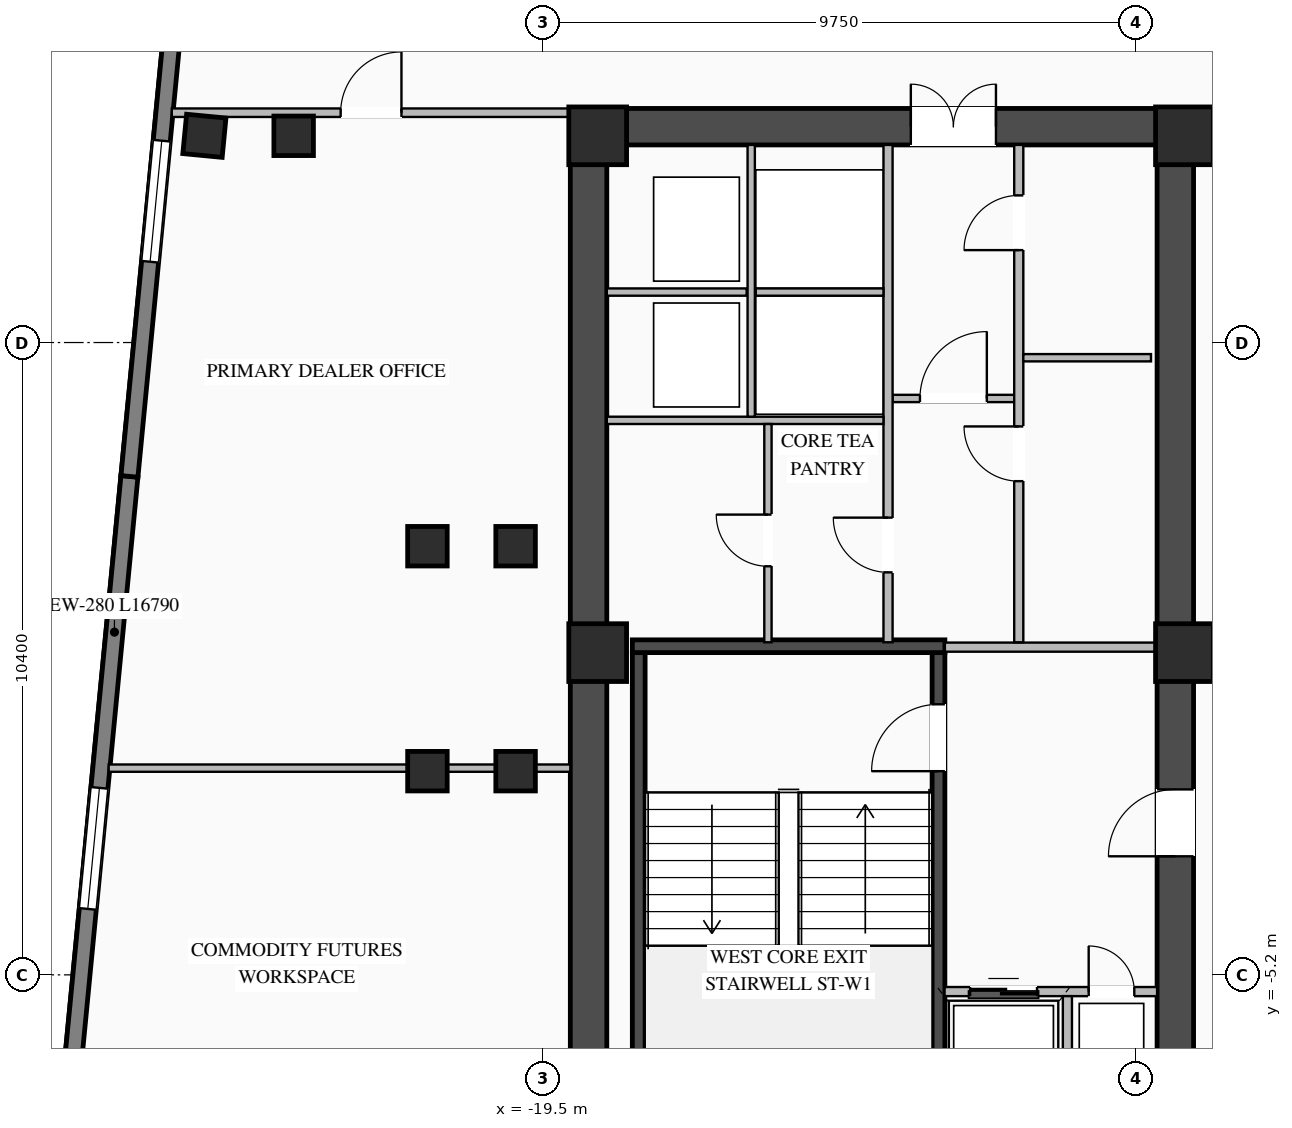
"""IFC4 building model, lengths in metres.
Left out: names, types, materials, properties, quantities, classifications, styles, units other than length and angle.
Written with IfcOpenShell. Run it as: python <this file> out.ifc"""

import sys

from ifc_helpers import new_model, si_unit, direction, frame, frame_2d, origin, origin_2d, place, context, subcontext, project, spatial, rectangle, i_section, extrude, element, fill, save


model = new_model("IFC4")
c1 = context("Model", 3, precision=1e-05, world=origin(), true_north=direction((0.0, 1.0)))
c2 = subcontext(c1, "Body", "Model", "MODEL_VIEW")
j1 = project(units=[si_unit("LENGTHUNIT", "METRE"), si_unit("PLANEANGLEUNIT", "RADIAN")], contexts=[c1])
p1 = place(None, origin())
s1 = spatial("IfcSite", under=j1, at=p1, CompositionType="ELEMENT")
p2 = place(p1, origin())
s2 = spatial("IfcBuilding", under=s1, at=p2, CompositionType="ELEMENT")
p3 = place(p2, frame((0.0, 0.0, 181.1)))
s3 = spatial("IfcBuildingStorey", under=s2, at=p3, CompositionType="ELEMENT", Elevation=181.1)
p4 = place(p3, frame((-19.05, 8.75, 0.0), z_axis=(0.0, 0.0, 1.0), x_axis=(1.0, 0.0, 0.0)))
e1 = element("IfcWall", 1, at=p4, inside=s3, PredefinedType="SHEAR", context=c2, shape_type="SweptSolid", body=[
    extrude(rectangle(XDim=10.25, YDim=0.6, at=frame_2d((5.125, 0.0))), origin(), (0.0, 0.0, 1.0), 3.27),
])
p5 = place(p4, frame((5.6, 0.0, 0.0)))
e2 = element("IfcOpeningElement", 2, at=p5, cuts=e1, PredefinedType="OPENING", context=c2, shape_type="SweptSolid", body=[
    extrude(rectangle(XDim=1.4, YDim=2.05, at=frame_2d((0.7, 1.025))), frame((0.0, 0.31, 0.0), z_axis=(0.0, -1.0, 0.0), x_axis=(1.0, 0.0, 0.0)), (0.0, 0.0, 1.0), 0.62),
])
p6 = place(p3, frame((-18.75, -8.45, 0.0), z_axis=(0.0, 0.0, 1.0), x_axis=(0.0, 1.0, 0.0)))
e3 = element("IfcWall", 3, at=p6, inside=s3, PredefinedType="SHEAR", context=c2, shape_type="SweptSolid", body=[
    extrude(rectangle(XDim=16.9, YDim=0.6, at=frame_2d((8.45, 0.0))), origin(), (0.0, 0.0, 1.0), 3.27),
])
p7 = place(p3, frame((-9.1, -8.45, 0.0), z_axis=(0.0, 0.0, 1.0), x_axis=(0.0, 1.0, 0.0)))
e4 = element("IfcWall", 4, at=p7, inside=s3, PredefinedType="SHEAR", context=c2, shape_type="SweptSolid", body=[
    extrude(rectangle(XDim=16.9, YDim=0.6, at=frame_2d((8.45, 0.0))), origin(), (0.0, 0.0, 1.0), 3.27),
])
p8 = place(p7, frame((5.2, 0.0, 0.0)))
e5 = element("IfcOpeningElement", 5, at=p8, cuts=e4, PredefinedType="OPENING", context=c2, shape_type="SweptSolid", body=[
    extrude(rectangle(XDim=1.1, YDim=2.08, at=frame_2d((0.55, 1.04))), frame((0.0, 0.31, 0.0), z_axis=(0.0, -1.0, 0.0), x_axis=(1.0, 0.0, 0.0)), (0.0, 0.0, 1.0), 0.62),
])
p9 = place(p3, frame((-12.995, -8.1, 0.0), z_axis=(0.0, 0.0, 1.0), x_axis=(0.0, 1.0, 0.0)))
e6 = element("IfcWall", 6, at=p9, inside=s3, PredefinedType="SHEAR", context=c2, shape_type="SweptSolid", body=[
    extrude(rectangle(XDim=8.2, YDim=0.21, at=frame_2d((4.1, 0.0))), origin(), (0.0, 0.0, 1.0), 3.27),
])
p10 = place(p9, frame((6.25, 0.0, 0.0)))
e7 = element("IfcOpeningElement", 7, at=p10, cuts=e6, PredefinedType="OPENING", context=c2, shape_type="SweptSolid", body=[
    extrude(rectangle(XDim=1.1, YDim=2.15, at=frame_2d((0.55, 1.075))), frame((0.0, 0.115, 0.0), z_axis=(0.0, -1.0, 0.0), x_axis=(1.0, 0.0, 0.0)), (0.0, 0.0, 1.0), 0.23),
])
p11 = place(p3, frame((-17.925, -8.1, 0.0), z_axis=(0.0, 0.0, 1.0), x_axis=(0.0, 1.0, 0.0)))
e8 = element("IfcWall", 8, at=p11, inside=s3, PredefinedType="SHEAR", context=c2, shape_type="SweptSolid", body=[
    extrude(rectangle(XDim=8.2, YDim=0.21, at=frame_2d((4.1, 0.0))), origin(), (0.0, 0.0, 1.0), 3.27),
])
p12 = place(p3, frame((-12.89, 0.205, 0.0), z_axis=(0.0, 0.0, 1.0), x_axis=(-1.0, 0.0, 0.0)))
e9 = element("IfcWall", 9, at=p12, inside=s3, PredefinedType="SHEAR", context=c2, shape_type="SweptSolid", body=[
    extrude(rectangle(XDim=5.14, YDim=0.21, at=frame_2d((2.57, 0.0))), origin(), (0.0, 0.0, 1.0), 3.27),
])
for number, where, z_axis, x_axis in (
    (10, (-8.95, 0.1, 0.0), (0.0, 0.0, 1.0), (1.0, 0.0, 0.0)),
    (11, (-8.95, 8.6, 0.0), (0.0, 0.0, 1.0), (1.0, 0.0, 0.0)),
    (12, (-18.6, 0.1, 0.0), (0.0, 0.0, 1.0), (1.0, 0.0, 0.0)),
    (13, (-18.6, 8.6, 0.0), (0.0, 0.0, 1.0), (1.0, 0.0, 0.0)),
):
    element("IfcColumn", number, at=place(p3, frame(where, z_axis=z_axis, x_axis=x_axis)), inside=s3, PredefinedType="COLUMN", context=c2, shape_type="SweptSolid", body=[
        extrude(rectangle(XDim=0.95, YDim=0.95, at=origin_2d()), origin(), (0.0, 0.0, 1.0), 3.45),
    ])
for number, where, z_axis, x_axis in (
    (14, (-21.4, -1.85, 0.0), (0.0, 0.0, 1.0), (1.0, 0.0, 0.0)),
    (15, (-21.4, 1.85, 0.0), (0.0, 0.0, 1.0), (1.0, 0.0, 0.0)),
    (16, (-19.95, -1.85, 0.0), (0.0, 0.0, 1.0), (1.0, 0.0, 0.0)),
    (17, (-19.95, 1.85, 0.0), (0.0, 0.0, 1.0), (1.0, 0.0, 0.0)),
    (18, (-23.6, 8.6, 0.0), (0.0, 0.0, 1.0), (1.0, 0.0, 0.0)),
    (19, (-25.068, 8.6, 0.0), (0.0, 0.0, 1.0), (0.995, -0.096, 0.0)),
):
    element("IfcColumn", number, at=place(p3, frame(where, z_axis=z_axis, x_axis=x_axis)), inside=s3, PredefinedType="COLUMN", context=c2, shape_type="SweptSolid", body=[
        extrude(i_section(OverallWidth=0.65, OverallDepth=0.65, WebThickness=0.028, FlangeThickness=0.04, at=origin_2d()), origin(), (0.0, 0.0, 1.0), 3.45),
    ])
p13 = place(p3, frame((-27.91, -13.714, 0.0), z_axis=(0.0, 0.0, 1.0), x_axis=(0.095839027265, 0.995396845913, 0.0)))
e20 = element("IfcWall", 20, at=p13, inside=s3, PredefinedType="STANDARD", context=c2, shape_type="SweptSolid", body=[
    extrude(rectangle(XDim=16.79, YDim=0.28, at=frame_2d((8.395, 0.0))), origin(), (0.0, 0.0, 1.0), 3.25),
])
p14 = place(p13, frame((5.147, 0.0, 0.76)))
e21 = element("IfcOpeningElement", 21, at=p14, cuts=e20, PredefinedType="OPENING", context=c2, shape_type="SweptSolid", body=[
    extrude(rectangle(XDim=2.0, YDim=2.05, at=frame_2d((1.0, 1.025))), frame((0.0, 0.15, 0.0), z_axis=(0.0, -1.0, 0.0), x_axis=(1.0, 0.0, 0.0)), (0.0, 0.0, 1.0), 0.3),
])
p15 = place(p13, frame((9.643, 0.0, 0.76)))
e22 = element("IfcOpeningElement", 22, at=p15, cuts=e20, PredefinedType="OPENING", context=c2, shape_type="SweptSolid", body=[
    extrude(rectangle(XDim=2.0, YDim=2.05, at=frame_2d((1.0, 1.025))), frame((0.0, 0.15, 0.0), z_axis=(0.0, -1.0, 0.0), x_axis=(1.0, 0.0, 0.0)), (0.0, 0.0, 1.0), 0.3),
])
p16 = place(p3, frame((-26.301, 2.998, 0.0), z_axis=(0.0, 0.0, 1.0), x_axis=(0.095837640115, 0.99539697947, 0.0)))
e23 = element("IfcWall", 23, at=p16, inside=s3, PredefinedType="STANDARD", context=c2, shape_type="SweptSolid", body=[
    extrude(rectangle(XDim=16.79, YDim=0.28, at=frame_2d((8.395, 0.0))), origin(), (0.0, 0.0, 1.0), 3.25),
])
p17 = place(p16, frame((3.547, 0.0, 0.76)))
e24 = element("IfcOpeningElement", 24, at=p17, cuts=e23, PredefinedType="OPENING", context=c2, shape_type="SweptSolid", body=[
    extrude(rectangle(XDim=2.0, YDim=2.05, at=frame_2d((1.0, 1.025))), frame((0.0, 0.15, 0.0), z_axis=(0.0, -1.0, 0.0), x_axis=(1.0, 0.0, 0.0)), (0.0, 0.0, 1.0), 0.3),
])
p18 = place(p16, frame((10.193, 0.0, 0.76)))
e25 = element("IfcOpeningElement", 25, at=p18, cuts=e23, PredefinedType="OPENING", context=c2, shape_type="SweptSolid", body=[
    extrude(rectangle(XDim=2.0, YDim=2.05, at=frame_2d((1.0, 1.025))), frame((0.0, 0.15, 0.0), z_axis=(0.0, -1.0, 0.0), x_axis=(1.0, 0.0, 0.0)), (0.0, 0.0, 1.0), 0.3),
])
p19 = place(p3, frame((-12.895, -5.475, 0.0), z_axis=(0.0, 0.0, 1.0), x_axis=(1.0, 0.0, 0.0)))
e26 = element("IfcWall", 26, at=p19, inside=s3, PredefinedType="STANDARD", context=c2, shape_type="SweptSolid", body=[
    extrude(rectangle(XDim=3.495, YDim=0.15, at=frame_2d((1.748, 0.0))), origin(), (0.0, 0.0, 1.0), 3.25),
])
p20 = place(p19, frame((0.42, 0.0, 0.0)))
e27 = element("IfcOpeningElement", 27, at=p20, cuts=e26, PredefinedType="OPENING", context=c2, shape_type="SweptSolid", body=[
    extrude(rectangle(XDim=1.1, YDim=2.15, at=frame_2d((0.55, 1.075))), frame((0.0, 0.085, 0.0), z_axis=(0.0, -1.0, 0.0), x_axis=(1.0, 0.0, 0.0)), (0.0, 0.0, 1.0), 0.17),
])
p21 = place(p19, frame((2.37, 0.0, 0.0)))
e28 = element("IfcOpeningElement", 28, at=p21, cuts=e26, PredefinedType="OPENING", context=c2, shape_type="SweptSolid", body=[
    extrude(rectangle(XDim=0.75, YDim=2.05, at=frame_2d((0.375, 1.025))), frame((0.0, 0.085, 0.0), z_axis=(0.0, -1.0, 0.0), x_axis=(1.0, 0.0, 0.0)), (0.0, 0.0, 1.0), 0.17),
])
p22 = place(p3, frame((-10.875, -8.45, 0.0), z_axis=(0.0, 0.0, 1.0), x_axis=(0.0, 1.0, 0.0)))
e29 = element("IfcWall", 29, at=p22, inside=s3, PredefinedType="STANDARD", context=c2, shape_type="SweptSolid", body=[
    extrude(rectangle(XDim=2.9, YDim=0.15, at=frame_2d((1.45, 0.0))), origin(), (0.0, 0.0, 1.0), 3.25),
])
p23 = place(p3, frame((-12.89, 0.19, 0.0), z_axis=(0.0, 0.0, 1.0), x_axis=(1.0, 0.0, 0.0)))
e30 = element("IfcWall", 30, at=p23, inside=s3, PredefinedType="STANDARD", context=c2, shape_type="SweptSolid", body=[
    extrude(rectangle(XDim=3.49, YDim=0.15, at=frame_2d((1.745, 0.0))), origin(), (0.0, 0.0, 1.0), 2.645),
])
p24 = place(p3, frame((-13.75, 4.28, 0.0), z_axis=(0.0, 0.0, 1.0), x_axis=(1.0, 0.0, 0.0)))
e31 = element("IfcWall", 31, at=p24, inside=s3, PredefinedType="STANDARD", context=c2, shape_type="SweptSolid", body=[
    extrude(rectangle(XDim=2.0, YDim=0.12, at=frame_2d((1.0, 0.0))), origin(), (0.0, 0.0, 1.0), 3.25),
])
p25 = place(p24, frame((0.45, 0.0, 0.0)))
e32 = element("IfcOpeningElement", 32, at=p25, cuts=e31, PredefinedType="OPENING", context=c2, shape_type="SweptSolid", body=[
    extrude(rectangle(XDim=1.1, YDim=2.1, at=frame_2d((0.55, 1.05))), frame((0.0, 0.07, 0.0), z_axis=(0.0, -1.0, 0.0), x_axis=(1.0, 0.0, 0.0)), (0.0, 0.0, 1.0), 0.14),
])
p26 = place(p3, frame((-11.675, 0.27, 0.0), z_axis=(0.0, 0.0, 1.0), x_axis=(0.0, 1.0, 0.0)))
e33 = element("IfcWall", 33, at=p26, inside=s3, PredefinedType="STANDARD", context=c2, shape_type="SweptSolid", body=[
    extrude(rectangle(XDim=8.18, YDim=0.15, at=frame_2d((4.09, 0.0))), origin(), (0.0, 0.0, 1.0), 3.25),
])
p27 = place(p26, frame((2.65, 0.0, 0.0)))
e34 = element("IfcOpeningElement", 34, at=p27, cuts=e33, PredefinedType="OPENING", context=c2, shape_type="SweptSolid", body=[
    extrude(rectangle(XDim=0.9, YDim=2.05, at=frame_2d((0.45, 1.025))), frame((0.0, 0.085, 0.0), z_axis=(0.0, -1.0, 0.0), x_axis=(1.0, 0.0, 0.0)), (0.0, 0.0, 1.0), 0.17),
])
p28 = place(p26, frame((6.45, 0.0, 0.0)))
e35 = element("IfcOpeningElement", 35, at=p28, cuts=e33, PredefinedType="OPENING", context=c2, shape_type="SweptSolid", body=[
    extrude(rectangle(XDim=0.9, YDim=2.05, at=frame_2d((0.45, 1.025))), frame((0.0, 0.085, 0.0), z_axis=(0.0, -1.0, 0.0), x_axis=(1.0, 0.0, 0.0)), (0.0, 0.0, 1.0), 0.17),
])
p29 = place(p3, frame((-11.6, 4.95, 0.0), z_axis=(0.0, 0.0, 1.0), x_axis=(1.0, 0.0, 0.0)))
e36 = element("IfcWall", 36, at=p29, inside=s3, PredefinedType="STANDARD", context=c2, shape_type="SweptSolid", body=[
    extrude(rectangle(XDim=2.1, YDim=0.12, at=frame_2d((1.05, 0.0))), origin(), (0.0, 0.0, 1.0), 3.25),
])
p30 = place(p3, frame((-13.825, 0.27, 0.0), z_axis=(0.0, 0.0, 1.0), x_axis=(0.0, 1.0, 0.0)))
e37 = element("IfcWall", 37, at=p30, inside=s3, PredefinedType="STANDARD", context=c2, shape_type="SweptSolid", body=[
    extrude(rectangle(XDim=8.18, YDim=0.15, at=frame_2d((4.09, 0.0))), origin(), (0.0, 0.0, 1.0), 3.25),
])
p31 = place(p30, frame((1.15, 0.0, 0.0)))
e38 = element("IfcOpeningElement", 38, at=p31, cuts=e37, PredefinedType="OPENING", context=c2, shape_type="SweptSolid", body=[
    extrude(rectangle(XDim=0.9, YDim=2.05, at=frame_2d((0.45, 1.025))), frame((0.0, 0.085, 0.0), z_axis=(0.0, -1.0, 0.0), x_axis=(1.0, 0.0, 0.0)), (0.0, 0.0, 1.0), 0.17),
])
p32 = place(p3, frame((-18.45, 3.92, 0.0), z_axis=(0.0, 0.0, 1.0), x_axis=(1.0, 0.0, 0.0)))
e39 = element("IfcWall", 39, at=p32, inside=s3, PredefinedType="STANDARD", context=c2, shape_type="SweptSolid", body=[
    extrude(rectangle(XDim=4.55, YDim=0.12, at=frame_2d((2.275, 0.0))), origin(), (0.0, 0.0, 1.0), 3.25),
])
p33 = place(p3, frame((-18.45, 6.03, 0.0), z_axis=(0.0, 0.0, 1.0), x_axis=(1.0, 0.0, 0.0)))
e40 = element("IfcWall", 40, at=p33, inside=s3, PredefinedType="STANDARD", context=c2, shape_type="SweptSolid", body=[
    extrude(rectangle(XDim=2.3, YDim=0.12, at=frame_2d((1.15, 0.0))), origin(), (0.0, 0.0, 1.0), 3.25),
])
p34 = place(p3, frame((-16.075, 3.98, 0.0), z_axis=(0.0, 0.0, 1.0), x_axis=(0.0, 1.0, 0.0)))
e41 = element("IfcWall", 41, at=p34, inside=s3, PredefinedType="STANDARD", context=c2, shape_type="SweptSolid", body=[
    extrude(rectangle(XDim=4.47, YDim=0.12, at=frame_2d((2.235, 0.0))), origin(), (0.0, 0.0, 1.0), 3.25),
])
p35 = place(p3, frame((-16.0, 6.03, 0.0), z_axis=(0.0, 0.0, 1.0), x_axis=(1.0, 0.0, 0.0)))
e42 = element("IfcWall", 42, at=p35, inside=s3, PredefinedType="STANDARD", context=c2, shape_type="SweptSolid", body=[
    extrude(rectangle(XDim=2.1, YDim=0.12, at=frame_2d((1.05, 0.0))), origin(), (0.0, 0.0, 1.0), 3.25),
])
p36 = place(p3, frame((-15.8, 0.27, 0.0), z_axis=(0.0, 0.0, 1.0), x_axis=(0.0, 1.0, 0.0)))
e43 = element("IfcWall", 43, at=p36, inside=s3, PredefinedType="STANDARD", context=c2, shape_type="SweptSolid", body=[
    extrude(rectangle(XDim=3.59, YDim=0.12, at=frame_2d((1.795, 0.0))), origin(), (0.0, 0.0, 1.0), 3.25),
])
p37 = place(p36, frame((1.25, 0.0, 0.0)))
e44 = element("IfcOpeningElement", 44, at=p37, cuts=e43, PredefinedType="OPENING", context=c2, shape_type="SweptSolid", body=[
    extrude(rectangle(XDim=0.85, YDim=2.05, at=frame_2d((0.425, 1.025))), frame((0.0, 0.07, 0.0), z_axis=(0.0, -1.0, 0.0), x_axis=(1.0, 0.0, 0.0)), (0.0, 0.0, 1.0), 0.14),
])
p38 = place(p3, frame((-25.604, 8.98, 0.0), z_axis=(0.0, 0.0, 1.0), x_axis=(1.0, 0.0, 0.0)))
e45 = element("IfcWall", 45, at=p38, inside=s3, PredefinedType="STANDARD", context=c2, shape_type="SweptSolid", body=[
    extrude(rectangle(XDim=6.554, YDim=0.14, at=frame_2d((3.277, 0.0))), origin(), (0.0, 0.0, 1.0), 3.25),
])
p39 = place(p38, frame((2.777, 0.0, 0.0)))
e46 = element("IfcOpeningElement", 46, at=p39, cuts=e45, PredefinedType="OPENING", context=c2, shape_type="SweptSolid", body=[
    extrude(rectangle(XDim=1.0, YDim=2.08, at=frame_2d((0.5, 1.04))), frame((0.0, 0.08, 0.0), z_axis=(0.0, -1.0, 0.0), x_axis=(1.0, 0.0, 0.0)), (0.0, 0.0, 1.0), 0.16),
])
p40 = place(p3, frame((-26.642, -1.8, 0.0), z_axis=(0.0, 0.0, 1.0), x_axis=(1.0, 0.0, 0.0)))
e47 = element("IfcWall", 47, at=p40, inside=s3, PredefinedType="STANDARD", context=c2, shape_type="SweptSolid", body=[
    extrude(rectangle(XDim=7.592, YDim=0.12, at=frame_2d((3.796, 0.0))), origin(), (0.0, 0.0, 1.0), 3.25),
])
p41 = place(p15, origin())
e48 = element("IfcWindow", 48, at=p41, inside=s3, PartitioningType="DOUBLE_PANEL_VERTICAL", PredefinedType="WINDOW", context=c2, shape_type="SweptSolid", body=[
    extrude(rectangle(XDim=2.0, YDim=2.05, at=frame_2d((1.0, 1.025))), frame((0.0, 0.03, 0.0), z_axis=(0.0, -1.0, 0.0), x_axis=(1.0, 0.0, 0.0)), (0.0, 0.0, 1.0), 0.06),
])
fill(e22, e48)
p42 = place(p17, origin())
e49 = element("IfcWindow", 49, at=p42, inside=s3, PartitioningType="DOUBLE_PANEL_VERTICAL", PredefinedType="WINDOW", context=c2, shape_type="SweptSolid", body=[
    extrude(rectangle(XDim=2.0, YDim=2.05, at=frame_2d((1.0, 1.025))), frame((0.0, 0.03, 0.0), z_axis=(0.0, -1.0, 0.0), x_axis=(1.0, 0.0, 0.0)), (0.0, 0.0, 1.0), 0.06),
])
fill(e24, e49)
p43 = place(p10, origin())
e50 = element("IfcDoor", 50, at=p43, inside=s3, OperationType="SINGLE_SWING_LEFT", PredefinedType="DOOR", context=c2, shape_type="SweptSolid", body=[
    extrude(rectangle(XDim=1.1, YDim=2.15, at=frame_2d((0.55, 1.075))), frame((0.0, 0.025, 0.0), z_axis=(0.0, -1.0, 0.0), x_axis=(1.0, 0.0, 0.0)), (0.0, 0.0, 1.0), 0.05),
])
fill(e7, e50)
p44 = place(p20, origin())
e51 = element("IfcDoor", 51, at=p44, inside=s3, OperationType="DOUBLE_DOOR_SLIDING", PredefinedType="DOOR", context=c2, shape_type="SweptSolid", body=[
    extrude(rectangle(XDim=1.1, YDim=2.15, at=frame_2d((0.55, 1.075))), frame((0.0, 0.025, 0.0), z_axis=(0.0, -1.0, 0.0), x_axis=(1.0, 0.0, 0.0)), (0.0, 0.0, 1.0), 0.05),
])
fill(e27, e51)
p45 = place(p21, origin())
e52 = element("IfcDoor", 52, at=p45, inside=s3, OperationType="SINGLE_SWING_LEFT", PredefinedType="DOOR", context=c2, shape_type="SweptSolid", body=[
    extrude(rectangle(XDim=0.75, YDim=2.05, at=frame_2d((0.375, 1.025))), frame((0.0, 0.025, 0.0), z_axis=(0.0, -1.0, 0.0), x_axis=(1.0, 0.0, 0.0)), (0.0, 0.0, 1.0), 0.05),
])
fill(e28, e52)
p46 = place(p8, origin())
e53 = element("IfcDoor", 53, at=p46, inside=s3, OperationType="SINGLE_SWING_LEFT", PredefinedType="DOOR", context=c2, shape_type="SweptSolid", body=[
    extrude(rectangle(XDim=1.1, YDim=2.08, at=frame_2d((0.55, 1.04))), frame((0.0, 0.255, 0.0), z_axis=(0.0, -1.0, 0.0), x_axis=(1.0, 0.0, 0.0)), (0.0, 0.0, 1.0), 0.05),
])
fill(e5, e53)
p47 = place(p25, origin())
e54 = element("IfcDoor", 54, at=p47, inside=s3, OperationType="SINGLE_SWING_RIGHT", PredefinedType="DOOR", context=c2, shape_type="SweptSolid", body=[
    extrude(rectangle(XDim=1.1, YDim=2.1, at=frame_2d((0.55, 1.05))), frame((0.0, 0.025, 0.0), z_axis=(0.0, -1.0, 0.0), x_axis=(1.0, 0.0, 0.0)), (0.0, 0.0, 1.0), 0.05),
])
fill(e32, e54)
p48 = place(p5, origin())
e55 = element("IfcDoor", 55, at=p48, inside=s3, OperationType="DOUBLE_DOOR_SINGLE_SWING", PredefinedType="DOOR", context=c2, shape_type="SweptSolid", body=[
    extrude(rectangle(XDim=1.4, YDim=2.05, at=frame_2d((0.7, 1.025))), frame((0.0, 0.245, 0.0), z_axis=(0.0, -1.0, 0.0), x_axis=(1.0, 0.0, 0.0)), (0.0, 0.0, 1.0), 0.05),
])
fill(e2, e55)
p49 = place(p27, origin())
e56 = element("IfcDoor", 56, at=p49, inside=s3, OperationType="SINGLE_SWING_RIGHT", PredefinedType="DOOR", context=c2, shape_type="SweptSolid", body=[
    extrude(rectangle(XDim=0.9, YDim=2.05, at=frame_2d((0.45, 1.025))), frame((0.0, 0.025, 0.0), z_axis=(0.0, -1.0, 0.0), x_axis=(1.0, 0.0, 0.0)), (0.0, 0.0, 1.0), 0.05),
])
fill(e34, e56)
p50 = place(p28, origin())
e57 = element("IfcDoor", 57, at=p50, inside=s3, OperationType="SINGLE_SWING_LEFT", PredefinedType="DOOR", context=c2, shape_type="SweptSolid", body=[
    extrude(rectangle(XDim=0.9, YDim=2.05, at=frame_2d((0.45, 1.025))), frame((0.0, 0.025, 0.0), z_axis=(0.0, -1.0, 0.0), x_axis=(1.0, 0.0, 0.0)), (0.0, 0.0, 1.0), 0.05),
])
fill(e35, e57)
p51 = place(p31, origin())
e58 = element("IfcDoor", 58, at=p51, inside=s3, OperationType="SINGLE_SWING_RIGHT", PredefinedType="DOOR", context=c2, shape_type="SweptSolid", body=[
    extrude(rectangle(XDim=0.9, YDim=2.05, at=frame_2d((0.45, 1.025))), frame((0.0, 0.025, 0.0), z_axis=(0.0, -1.0, 0.0), x_axis=(1.0, 0.0, 0.0)), (0.0, 0.0, 1.0), 0.05),
])
fill(e38, e58)
p52 = place(p37, origin())
e59 = element("IfcDoor", 59, at=p52, inside=s3, OperationType="SINGLE_SWING_RIGHT", PredefinedType="DOOR", context=c2, shape_type="SweptSolid", body=[
    extrude(rectangle(XDim=0.85, YDim=2.05, at=frame_2d((0.425, 1.025))), frame((0.0, 0.025, 0.0), z_axis=(0.0, -1.0, 0.0), x_axis=(1.0, 0.0, 0.0)), (0.0, 0.0, 1.0), 0.05),
])
fill(e44, e59)
p53 = place(p39, origin())
e60 = element("IfcDoor", 60, at=p53, inside=s3, OperationType="SINGLE_SWING_RIGHT", PredefinedType="DOOR", context=c2, shape_type="SweptSolid", body=[
    extrude(rectangle(XDim=1.0, YDim=2.08, at=frame_2d((0.5, 1.04))), frame((0.0, 0.025, 0.0), z_axis=(0.0, -1.0, 0.0), x_axis=(1.0, 0.0, 0.0)), (0.0, 0.0, 1.0), 0.05),
])
fill(e46, e60)
save(model, sys.argv[1])
